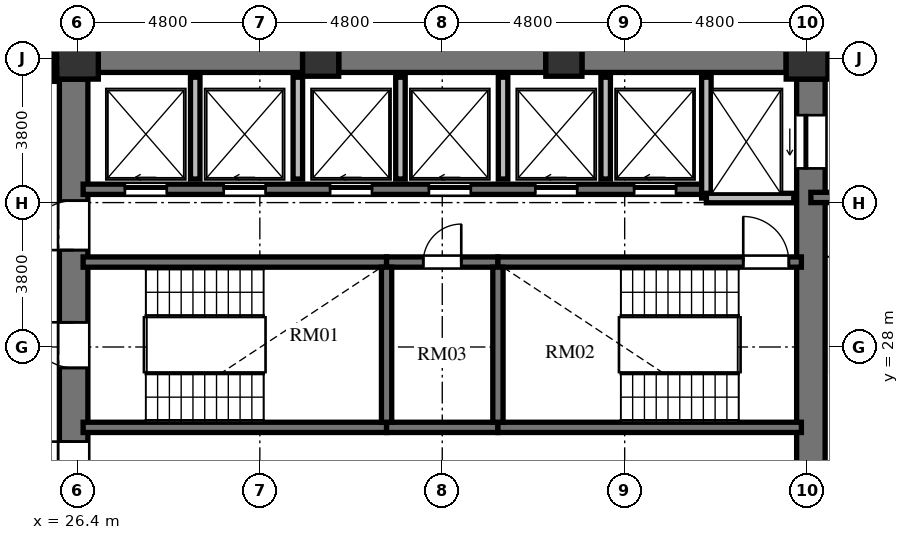
"""IFC4 building model, lengths in metres.
Left out: names, types, materials, properties, quantities, classifications, styles, units other than length and angle.
Written with IfcOpenShell. Run it as: python <this file> out.ifc"""

import sys

from ifc_helpers import new_model, si_unit, direction, frame, frame_2d, origin, origin_2d, place, context, subcontext, project, spatial, rectangle, extrude, element, fill, save


model = new_model("IFC4")
c1 = context("Model", 3, precision=1e-05, world=origin(), true_north=direction((0.0, 1.0)))
c2 = subcontext(c1, "Body", "Model", "MODEL_VIEW")
j1 = project(units=[si_unit("LENGTHUNIT", "METRE"), si_unit("PLANEANGLEUNIT", "RADIAN")], contexts=[c1])
p1 = place(None, origin())
s1 = spatial("IfcSite", under=j1, at=p1, CompositionType="ELEMENT")
p2 = place(p1, origin())
s2 = spatial("IfcBuilding", under=s1, at=p2, CompositionType="ELEMENT")
p3 = place(p2, frame((0.0, 0.0, 96.336)))
s3 = spatial("IfcBuildingStorey", under=s2, at=p3, CompositionType="ELEMENT", Elevation=96.336)
p4 = place(p3, frame((45.6, 35.6, 0.0), z_axis=(0.0, 0.0, 1.0), x_axis=(1.0, 0.0, 0.0)))
e1 = element("IfcColumn", 1, at=p4, inside=s3, PredefinedType="COLUMN", context=c2, shape_type="SweptSolid", body=[
    extrude(rectangle(XDim=1.1, YDim=1.1, at=origin_2d()), origin(), (0.0, 0.0, 1.0), 3.648),
])
for number, where, z_axis, x_axis in (
    (2, (39.2, 35.6, 0.0), (0.0, 0.0, 1.0), (1.0, 0.0, 0.0)),
    (3, (32.8, 35.6, 0.0), (0.0, 0.0, 1.0), (1.0, 0.0, 0.0)),
):
    element("IfcColumn", number, at=place(p3, frame(where, z_axis=z_axis, x_axis=x_axis)), inside=s3, PredefinedType="COLUMN", context=c2, shape_type="SweptSolid", body=[
        extrude(rectangle(XDim=0.95, YDim=0.95, at=origin_2d()), origin(), (0.0, 0.0, 1.0), 3.648),
    ])
p5 = place(p3, frame((26.4, 35.6, 0.0), z_axis=(0.0, 0.0, 1.0), x_axis=(1.0, 0.0, 0.0)))
e4 = element("IfcColumn", 4, at=p5, inside=s3, PredefinedType="COLUMN", context=c2, shape_type="SweptSolid", body=[
    extrude(rectangle(XDim=1.1, YDim=1.1, at=origin_2d()), origin(), (0.0, 0.0, 1.0), 3.648),
])
p6 = place(p3, frame((26.3, 20.95, 0.0), z_axis=(0.0, 0.0, 1.0), x_axis=(0.0, 1.0, 0.0)))
e5 = element("IfcWall", 5, at=p6, inside=s3, PredefinedType="SHEAR", context=c2, shape_type="SweptSolid", body=[
    extrude(rectangle(XDim=14.1, YDim=0.75, at=frame_2d((7.05, 0.0))), origin(), (0.0, 0.0, 1.0), 3.648),
])
p7 = place(p6, frame((6.5, 0.0, 0.0)))
e6 = element("IfcOpeningElement", 6, at=p7, cuts=e5, PredefinedType="OPENING", context=c2, shape_type="SweptSolid", body=[
    extrude(rectangle(XDim=1.2, YDim=2.15, at=frame_2d((0.6, 1.075))), frame((0.0, 0.385, 0.0), z_axis=(0.0, -1.0, 0.0), x_axis=(1.0, 0.0, 0.0)), (0.0, 0.0, 1.0), 0.77),
])
p8 = place(p6, frame((9.6, 0.0, 0.0)))
e7 = element("IfcOpeningElement", 7, at=p8, cuts=e5, PredefinedType="OPENING", context=c2, shape_type="SweptSolid", body=[
    extrude(rectangle(XDim=1.3, YDim=2.2, at=frame_2d((0.65, 1.1))), frame((0.0, 0.385, 0.0), z_axis=(0.0, -1.0, 0.0), x_axis=(1.0, 0.0, 0.0)), (0.0, 0.0, 1.0), 0.77),
])
p9 = place(p6, frame((3.26, 0.0, 0.0)))
e8 = element("IfcOpeningElement", 8, at=p9, cuts=e5, PredefinedType="OPENING", context=c2, shape_type="SweptSolid", body=[
    extrude(rectangle(XDim=1.3, YDim=2.2, at=frame_2d((0.65, 1.1))), frame((0.0, 0.385, 0.0), z_axis=(0.0, -1.0, 0.0), x_axis=(1.0, 0.0, 0.0)), (0.0, 0.0, 1.0), 0.77),
])
p10 = place(p3, frame((45.7, 20.95, 0.0), z_axis=(0.0, 0.0, 1.0), x_axis=(0.0, 1.0, 0.0)))
e9 = element("IfcWall", 9, at=p10, inside=s3, PredefinedType="SHEAR", context=c2, shape_type="SweptSolid", body=[
    extrude(rectangle(XDim=14.1, YDim=0.75, at=frame_2d((7.05, 0.0))), origin(), (0.0, 0.0, 1.0), 3.648),
])
p11 = place(p10, frame((11.75, 0.0, 0.0)))
e10 = element("IfcOpeningElement", 10, at=p11, cuts=e9, PredefinedType="OPENING", context=c2, shape_type="SweptSolid", body=[
    extrude(rectangle(XDim=1.4, YDim=2.3, at=frame_2d((0.7, 1.15))), frame((0.0, 0.385, 0.0), z_axis=(0.0, -1.0, 0.0), x_axis=(1.0, 0.0, 0.0)), (0.0, 0.0, 1.0), 0.77),
])
p12 = place(p10, frame((0.95, 0.0, 0.0)))
e11 = element("IfcOpeningElement", 11, at=p12, cuts=e9, PredefinedType="OPENING", context=c2, shape_type="SweptSolid", body=[
    extrude(rectangle(XDim=1.4, YDim=2.3, at=frame_2d((0.7, 1.15))), frame((0.0, 0.385, 0.0), z_axis=(0.0, -1.0, 0.0), x_axis=(1.0, 0.0, 0.0)), (0.0, 0.0, 1.0), 0.77),
])
p13 = place(p3, frame((26.95, 35.6, 0.0), z_axis=(0.0, 0.0, 1.0), x_axis=(1.0, 0.0, 0.0)))
e12 = element("IfcWall", 12, at=p13, inside=s3, PredefinedType="SHEAR", context=c2, shape_type="SweptSolid", body=[
    extrude(rectangle(XDim=5.375, YDim=0.75, at=frame_2d((2.688, 0.0))), origin(), (0.0, 0.0, 1.0), 3.648),
])
p14 = place(p3, frame((33.275, 35.6, 0.0), z_axis=(0.0, 0.0, 1.0), x_axis=(1.0, 0.0, 0.0)))
e13 = element("IfcWall", 13, at=p14, inside=s3, PredefinedType="SHEAR", context=c2, shape_type="SweptSolid", body=[
    extrude(rectangle(XDim=5.45, YDim=0.75, at=frame_2d((2.725, 0.0))), origin(), (0.0, 0.0, 1.0), 3.648),
])
p15 = place(p3, frame((39.675, 35.6, 0.0), z_axis=(0.0, 0.0, 1.0), x_axis=(1.0, 0.0, 0.0)))
e14 = element("IfcWall", 14, at=p15, inside=s3, PredefinedType="SHEAR", context=c2, shape_type="SweptSolid", body=[
    extrude(rectangle(XDim=5.375, YDim=0.75, at=frame_2d((2.688, 0.0))), origin(), (0.0, 0.0, 1.0), 3.648),
])
p16 = place(p3, frame((26.55, 30.235, 0.0), z_axis=(0.0, 0.0, 1.0), x_axis=(1.0, 0.0, 0.0)))
e15 = element("IfcWall", 15, at=p16, inside=s3, PredefinedType="SHEAR", context=c2, shape_type="SweptSolid", body=[
    extrude(rectangle(XDim=7.985, YDim=0.27, at=frame_2d((3.992, 0.0))), origin(), (0.0, 0.0, 1.0), 3.648),
])
p17 = place(p3, frame((34.535, 30.235, 0.0), z_axis=(0.0, 0.0, 1.0), x_axis=(1.0, 0.0, 0.0)))
e16 = element("IfcWall", 16, at=p17, inside=s3, PredefinedType="SHEAR", context=c2, shape_type="SweptSolid", body=[
    extrude(rectangle(XDim=2.93, YDim=0.27, at=frame_2d((1.465, 0.0))), origin(), (0.0, 0.0, 1.0), 3.648),
])
p18 = place(p17, frame((0.965, 0.0, 0.0)))
e17 = element("IfcOpeningElement", 17, at=p18, cuts=e16, PredefinedType="OPENING", context=c2, shape_type="SweptSolid", body=[
    extrude(rectangle(XDim=1.0, YDim=2.1, at=frame_2d((0.5, 1.05))), frame((0.0, 0.145, 0.0), z_axis=(0.0, -1.0, 0.0), x_axis=(1.0, 0.0, 0.0)), (0.0, 0.0, 1.0), 0.29),
])
p19 = place(p3, frame((37.465, 30.235, 0.0), z_axis=(0.0, 0.0, 1.0), x_axis=(1.0, 0.0, 0.0)))
e18 = element("IfcWall", 18, at=p19, inside=s3, PredefinedType="SHEAR", context=c2, shape_type="SweptSolid", body=[
    extrude(rectangle(XDim=7.985, YDim=0.27, at=frame_2d((3.992, 0.0))), origin(), (0.0, 0.0, 1.0), 3.648),
])
p20 = place(p19, frame((6.455, 0.0, 0.0)))
e19 = element("IfcOpeningElement", 19, at=p20, cuts=e18, PredefinedType="OPENING", context=c2, shape_type="SweptSolid", body=[
    extrude(rectangle(XDim=1.2, YDim=2.15, at=frame_2d((0.6, 1.075))), frame((0.0, 0.145, 0.0), z_axis=(0.0, -1.0, 0.0), x_axis=(1.0, 0.0, 0.0)), (0.0, 0.0, 1.0), 0.29),
])
p21 = place(p3, frame((26.55, 25.885, 0.0), z_axis=(0.0, 0.0, 1.0), x_axis=(1.0, 0.0, 0.0)))
e20 = element("IfcWall", 20, at=p21, inside=s3, PredefinedType="SHEAR", context=c2, shape_type="SweptSolid", body=[
    extrude(rectangle(XDim=7.985, YDim=0.27, at=frame_2d((3.992, 0.0))), origin(), (0.0, 0.0, 1.0), 3.648),
])
p22 = place(p3, frame((34.535, 25.885, 0.0), z_axis=(0.0, 0.0, 1.0), x_axis=(1.0, 0.0, 0.0)))
e21 = element("IfcWall", 21, at=p22, inside=s3, PredefinedType="SHEAR", context=c2, shape_type="SweptSolid", body=[
    extrude(rectangle(XDim=2.93, YDim=0.27, at=frame_2d((1.465, 0.0))), origin(), (0.0, 0.0, 1.0), 3.648),
])
p23 = place(p3, frame((37.465, 25.885, 0.0), z_axis=(0.0, 0.0, 1.0), x_axis=(1.0, 0.0, 0.0)))
e22 = element("IfcWall", 22, at=p23, inside=s3, PredefinedType="SHEAR", context=c2, shape_type="SweptSolid", body=[
    extrude(rectangle(XDim=7.985, YDim=0.27, at=frame_2d((3.992, 0.0))), origin(), (0.0, 0.0, 1.0), 3.648),
])
for number, where, z_axis, x_axis in (
    (23, (34.535, 26.02, 0.0), (0.0, 0.0, 1.0), (0.0, 1.0, 0.0)),
    (24, (37.465, 26.02, 0.0), (0.0, 0.0, 1.0), (0.0, 1.0, 0.0)),
):
    element("IfcWall", number, at=place(p3, frame(where, z_axis=z_axis, x_axis=x_axis)), inside=s3, PredefinedType="SHEAR", context=c2, shape_type="SweptSolid", body=[
        extrude(rectangle(XDim=4.08, YDim=0.27, at=frame_2d((2.04, 0.0))), origin(), (0.0, 0.0, 1.0), 3.648),
    ])
p24 = place(p3, frame((26.55, 32.15, 0.0), z_axis=(0.0, 0.0, 1.0), x_axis=(1.0, 0.0, 0.0)))
e25 = element("IfcWall", 25, at=p24, inside=s3, PredefinedType="SHEAR", context=c2, shape_type="SweptSolid", body=[
    extrude(rectangle(XDim=16.4, YDim=0.27, at=frame_2d((8.2, 0.0))), origin(), (0.0, 0.0, 1.0), 3.648),
])
p25 = place(p24, frame((1.1, 0.0, 0.0)))
e26 = element("IfcOpeningElement", 26, at=p25, cuts=e25, PredefinedType="OPENING", context=c2, shape_type="SweptSolid", body=[
    extrude(rectangle(XDim=1.1, YDim=2.2, at=frame_2d((0.55, 1.1))), frame((0.0, 0.145, 0.0), z_axis=(0.0, -1.0, 0.0), x_axis=(1.0, 0.0, 0.0)), (0.0, 0.0, 1.0), 0.29),
])
p26 = place(p24, frame((3.7, 0.0, 0.0)))
e27 = element("IfcOpeningElement", 27, at=p26, cuts=e25, PredefinedType="OPENING", context=c2, shape_type="SweptSolid", body=[
    extrude(rectangle(XDim=1.1, YDim=2.2, at=frame_2d((0.55, 1.1))), frame((0.0, 0.145, 0.0), z_axis=(0.0, -1.0, 0.0), x_axis=(1.0, 0.0, 0.0)), (0.0, 0.0, 1.0), 0.29),
])
p27 = place(p24, frame((6.5, 0.0, 0.0)))
e28 = element("IfcOpeningElement", 28, at=p27, cuts=e25, PredefinedType="OPENING", context=c2, shape_type="SweptSolid", body=[
    extrude(rectangle(XDim=1.1, YDim=2.2, at=frame_2d((0.55, 1.1))), frame((0.0, 0.145, 0.0), z_axis=(0.0, -1.0, 0.0), x_axis=(1.0, 0.0, 0.0)), (0.0, 0.0, 1.0), 0.29),
])
p28 = place(p24, frame((9.1, 0.0, 0.0)))
e29 = element("IfcOpeningElement", 29, at=p28, cuts=e25, PredefinedType="OPENING", context=c2, shape_type="SweptSolid", body=[
    extrude(rectangle(XDim=1.1, YDim=2.2, at=frame_2d((0.55, 1.1))), frame((0.0, 0.145, 0.0), z_axis=(0.0, -1.0, 0.0), x_axis=(1.0, 0.0, 0.0)), (0.0, 0.0, 1.0), 0.29),
])
p29 = place(p24, frame((11.9, 0.0, 0.0)))
e30 = element("IfcOpeningElement", 30, at=p29, cuts=e25, PredefinedType="OPENING", context=c2, shape_type="SweptSolid", body=[
    extrude(rectangle(XDim=1.1, YDim=2.2, at=frame_2d((0.55, 1.1))), frame((0.0, 0.145, 0.0), z_axis=(0.0, -1.0, 0.0), x_axis=(1.0, 0.0, 0.0)), (0.0, 0.0, 1.0), 0.29),
])
p30 = place(p24, frame((14.5, 0.0, 0.0)))
e31 = element("IfcOpeningElement", 31, at=p30, cuts=e25, PredefinedType="OPENING", context=c2, shape_type="SweptSolid", body=[
    extrude(rectangle(XDim=1.1, YDim=2.2, at=frame_2d((0.55, 1.1))), frame((0.0, 0.145, 0.0), z_axis=(0.0, -1.0, 0.0), x_axis=(1.0, 0.0, 0.0)), (0.0, 0.0, 1.0), 0.29),
])
p31 = place(p3, frame((42.95, 31.92, 0.0), z_axis=(0.0, 0.0, 1.0), x_axis=(0.0, 1.0, 0.0)))
e32 = element("IfcWall", 32, at=p31, inside=s3, PredefinedType="SOLIDWALL", context=c2, shape_type="SweptSolid", body=[
    extrude(rectangle(XDim=3.18, YDim=0.25, at=frame_2d((1.59, 0.0))), origin(), (0.0, 0.0, 1.0), 3.428),
])
p32 = place(p3, frame((42.95, 31.92, 0.0), z_axis=(0.0, 0.0, 1.0), x_axis=(1.0, 0.0, 0.0)))
e33 = element("IfcWall", 33, at=p32, inside=s3, PredefinedType="SOLIDWALL", context=c2, shape_type="SweptSolid", body=[
    extrude(rectangle(XDim=2.3, YDim=0.25, at=frame_2d((1.15, 0.0))), origin(), (0.0, 0.0, 1.0), 3.428),
])
for number, where, z_axis, x_axis in (
    (34, (29.5, 32.42, 0.0), (0.0, 0.0, 1.0), (0.0, 1.0, 0.0)),
    (35, (32.2, 32.42, 0.0), (0.0, 0.0, 1.0), (0.0, 1.0, 0.0)),
    (36, (34.9, 32.42, 0.0), (0.0, 0.0, 1.0), (0.0, 1.0, 0.0)),
    (37, (37.6, 32.42, 0.0), (0.0, 0.0, 1.0), (0.0, 1.0, 0.0)),
    (38, (40.3, 32.42, 0.0), (0.0, 0.0, 1.0), (0.0, 1.0, 0.0)),
):
    element("IfcWall", number, at=place(p3, frame(where, z_axis=z_axis, x_axis=x_axis)), inside=s3, PredefinedType="SOLIDWALL", context=c2, shape_type="SweptSolid", body=[
        extrude(rectangle(XDim=2.68, YDim=0.25, at=frame_2d((1.34, 0.0))), origin(), (0.0, 0.0, 1.0), 3.428),
    ])
p33 = place(p3, frame((45.7, 31.935, 0.0), z_axis=(0.0, 0.0, 1.0), x_axis=(1.0, 0.0, 0.0)))
e39 = element("IfcWall", 39, at=p33, inside=s3, PredefinedType="SHEAR", context=c2, shape_type="SweptSolid", body=[
    extrude(rectangle(XDim=4.715, YDim=0.27, at=frame_2d((2.357, 0.0))), origin(), (0.0, 0.0, 1.0), 3.648),
])
p34 = place(p3, frame((25.83, 36.21, 0.0), z_axis=(0.0, 0.0, 1.0), x_axis=(0.0, -1.0, 0.0)))
e40 = element("IfcWall", 40, at=p34, inside=s3, PredefinedType="PARTITIONING", context=c2, shape_type="SweptSolid", body=[
    extrude(rectangle(XDim=1.22, YDim=0.18, at=frame_2d((0.61, 0.0))), origin(), (0.0, 0.0, 1.0), 3.428),
])
p35 = place(p7, origin())
e41 = element("IfcDoor", 41, at=p35, inside=s3, OperationType="SINGLE_SWING_RIGHT", PredefinedType="DOOR", context=c2, shape_type="SweptSolid", body=[
    extrude(rectangle(XDim=1.2, YDim=2.15, at=frame_2d((0.6, 1.075))), frame((0.0, 0.025, 0.0), z_axis=(0.0, -1.0, 0.0), x_axis=(1.0, 0.0, 0.0)), (0.0, 0.0, 1.0), 0.05),
])
fill(e6, e41)
p36 = place(p20, origin())
e42 = element("IfcDoor", 42, at=p36, inside=s3, OperationType="SINGLE_SWING_LEFT", PredefinedType="DOOR", context=c2, shape_type="SweptSolid", body=[
    extrude(rectangle(XDim=1.2, YDim=2.15, at=frame_2d((0.6, 1.075))), frame((0.0, 0.025, 0.0), z_axis=(0.0, -1.0, 0.0), x_axis=(1.0, 0.0, 0.0)), (0.0, 0.0, 1.0), 0.05),
])
fill(e19, e42)
p37 = place(p18, origin())
e43 = element("IfcDoor", 43, at=p37, inside=s3, OperationType="SINGLE_SWING_RIGHT", PredefinedType="DOOR", context=c2, shape_type="SweptSolid", body=[
    extrude(rectangle(XDim=1.0, YDim=2.1, at=frame_2d((0.5, 1.05))), frame((0.0, 0.025, 0.0), z_axis=(0.0, -1.0, 0.0), x_axis=(1.0, 0.0, 0.0)), (0.0, 0.0, 1.0), 0.05),
])
fill(e17, e43)
p38 = place(p8, origin())
e44 = element("IfcDoor", 44, at=p38, inside=s3, OperationType="SINGLE_SWING_LEFT", PredefinedType="DOOR", context=c2, shape_type="SweptSolid", body=[
    extrude(rectangle(XDim=1.3, YDim=2.2, at=frame_2d((0.65, 1.1))), frame((0.0, 0.025, 0.0), z_axis=(0.0, -1.0, 0.0), x_axis=(1.0, 0.0, 0.0)), (0.0, 0.0, 1.0), 0.05),
])
fill(e7, e44)
p39 = place(p9, origin())
e45 = element("IfcDoor", 45, at=p39, inside=s3, OperationType="SINGLE_SWING_RIGHT", PredefinedType="DOOR", context=c2, shape_type="SweptSolid", body=[
    extrude(rectangle(XDim=1.3, YDim=2.2, at=frame_2d((0.65, 1.1))), frame((0.0, 0.025, 0.0), z_axis=(0.0, -1.0, 0.0), x_axis=(1.0, 0.0, 0.0)), (0.0, 0.0, 1.0), 0.05),
])
fill(e8, e45)
p40 = place(p25, origin())
e46 = element("IfcDoor", 46, at=p40, inside=s3, OperationType="SLIDING_TO_LEFT", PredefinedType="DOOR", context=c2, shape_type="SweptSolid", body=[
    extrude(rectangle(XDim=1.1, YDim=2.2, at=frame_2d((0.55, 1.1))), frame((0.0, 0.025, 0.0), z_axis=(0.0, -1.0, 0.0), x_axis=(1.0, 0.0, 0.0)), (0.0, 0.0, 1.0), 0.05),
])
fill(e26, e46)
p41 = place(p26, origin())
e47 = element("IfcDoor", 47, at=p41, inside=s3, OperationType="SLIDING_TO_LEFT", PredefinedType="DOOR", context=c2, shape_type="SweptSolid", body=[
    extrude(rectangle(XDim=1.1, YDim=2.2, at=frame_2d((0.55, 1.1))), frame((0.0, 0.025, 0.0), z_axis=(0.0, -1.0, 0.0), x_axis=(1.0, 0.0, 0.0)), (0.0, 0.0, 1.0), 0.05),
])
fill(e27, e47)
p42 = place(p27, origin())
e48 = element("IfcDoor", 48, at=p42, inside=s3, OperationType="SLIDING_TO_LEFT", PredefinedType="DOOR", context=c2, shape_type="SweptSolid", body=[
    extrude(rectangle(XDim=1.1, YDim=2.2, at=frame_2d((0.55, 1.1))), frame((0.0, 0.025, 0.0), z_axis=(0.0, -1.0, 0.0), x_axis=(1.0, 0.0, 0.0)), (0.0, 0.0, 1.0), 0.05),
])
fill(e28, e48)
p43 = place(p28, origin())
e49 = element("IfcDoor", 49, at=p43, inside=s3, OperationType="SLIDING_TO_LEFT", PredefinedType="DOOR", context=c2, shape_type="SweptSolid", body=[
    extrude(rectangle(XDim=1.1, YDim=2.2, at=frame_2d((0.55, 1.1))), frame((0.0, 0.025, 0.0), z_axis=(0.0, -1.0, 0.0), x_axis=(1.0, 0.0, 0.0)), (0.0, 0.0, 1.0), 0.05),
])
fill(e29, e49)
p44 = place(p29, origin())
e50 = element("IfcDoor", 50, at=p44, inside=s3, OperationType="SLIDING_TO_LEFT", PredefinedType="DOOR", context=c2, shape_type="SweptSolid", body=[
    extrude(rectangle(XDim=1.1, YDim=2.2, at=frame_2d((0.55, 1.1))), frame((0.0, 0.025, 0.0), z_axis=(0.0, -1.0, 0.0), x_axis=(1.0, 0.0, 0.0)), (0.0, 0.0, 1.0), 0.05),
])
fill(e30, e50)
p45 = place(p30, origin())
e51 = element("IfcDoor", 51, at=p45, inside=s3, OperationType="SLIDING_TO_LEFT", PredefinedType="DOOR", context=c2, shape_type="SweptSolid", body=[
    extrude(rectangle(XDim=1.1, YDim=2.2, at=frame_2d((0.55, 1.1))), frame((0.0, 0.025, 0.0), z_axis=(0.0, -1.0, 0.0), x_axis=(1.0, 0.0, 0.0)), (0.0, 0.0, 1.0), 0.05),
])
fill(e31, e51)
p46 = place(p11, origin())
e52 = element("IfcDoor", 52, at=p46, inside=s3, OperationType="SLIDING_TO_LEFT", PredefinedType="DOOR", context=c2, shape_type="SweptSolid", body=[
    extrude(rectangle(XDim=1.4, YDim=2.3, at=frame_2d((0.7, 1.15))), frame((0.0, 0.025, 0.0), z_axis=(0.0, -1.0, 0.0), x_axis=(1.0, 0.0, 0.0)), (0.0, 0.0, 1.0), 0.05),
])
fill(e10, e52)
save(model, sys.argv[1])
